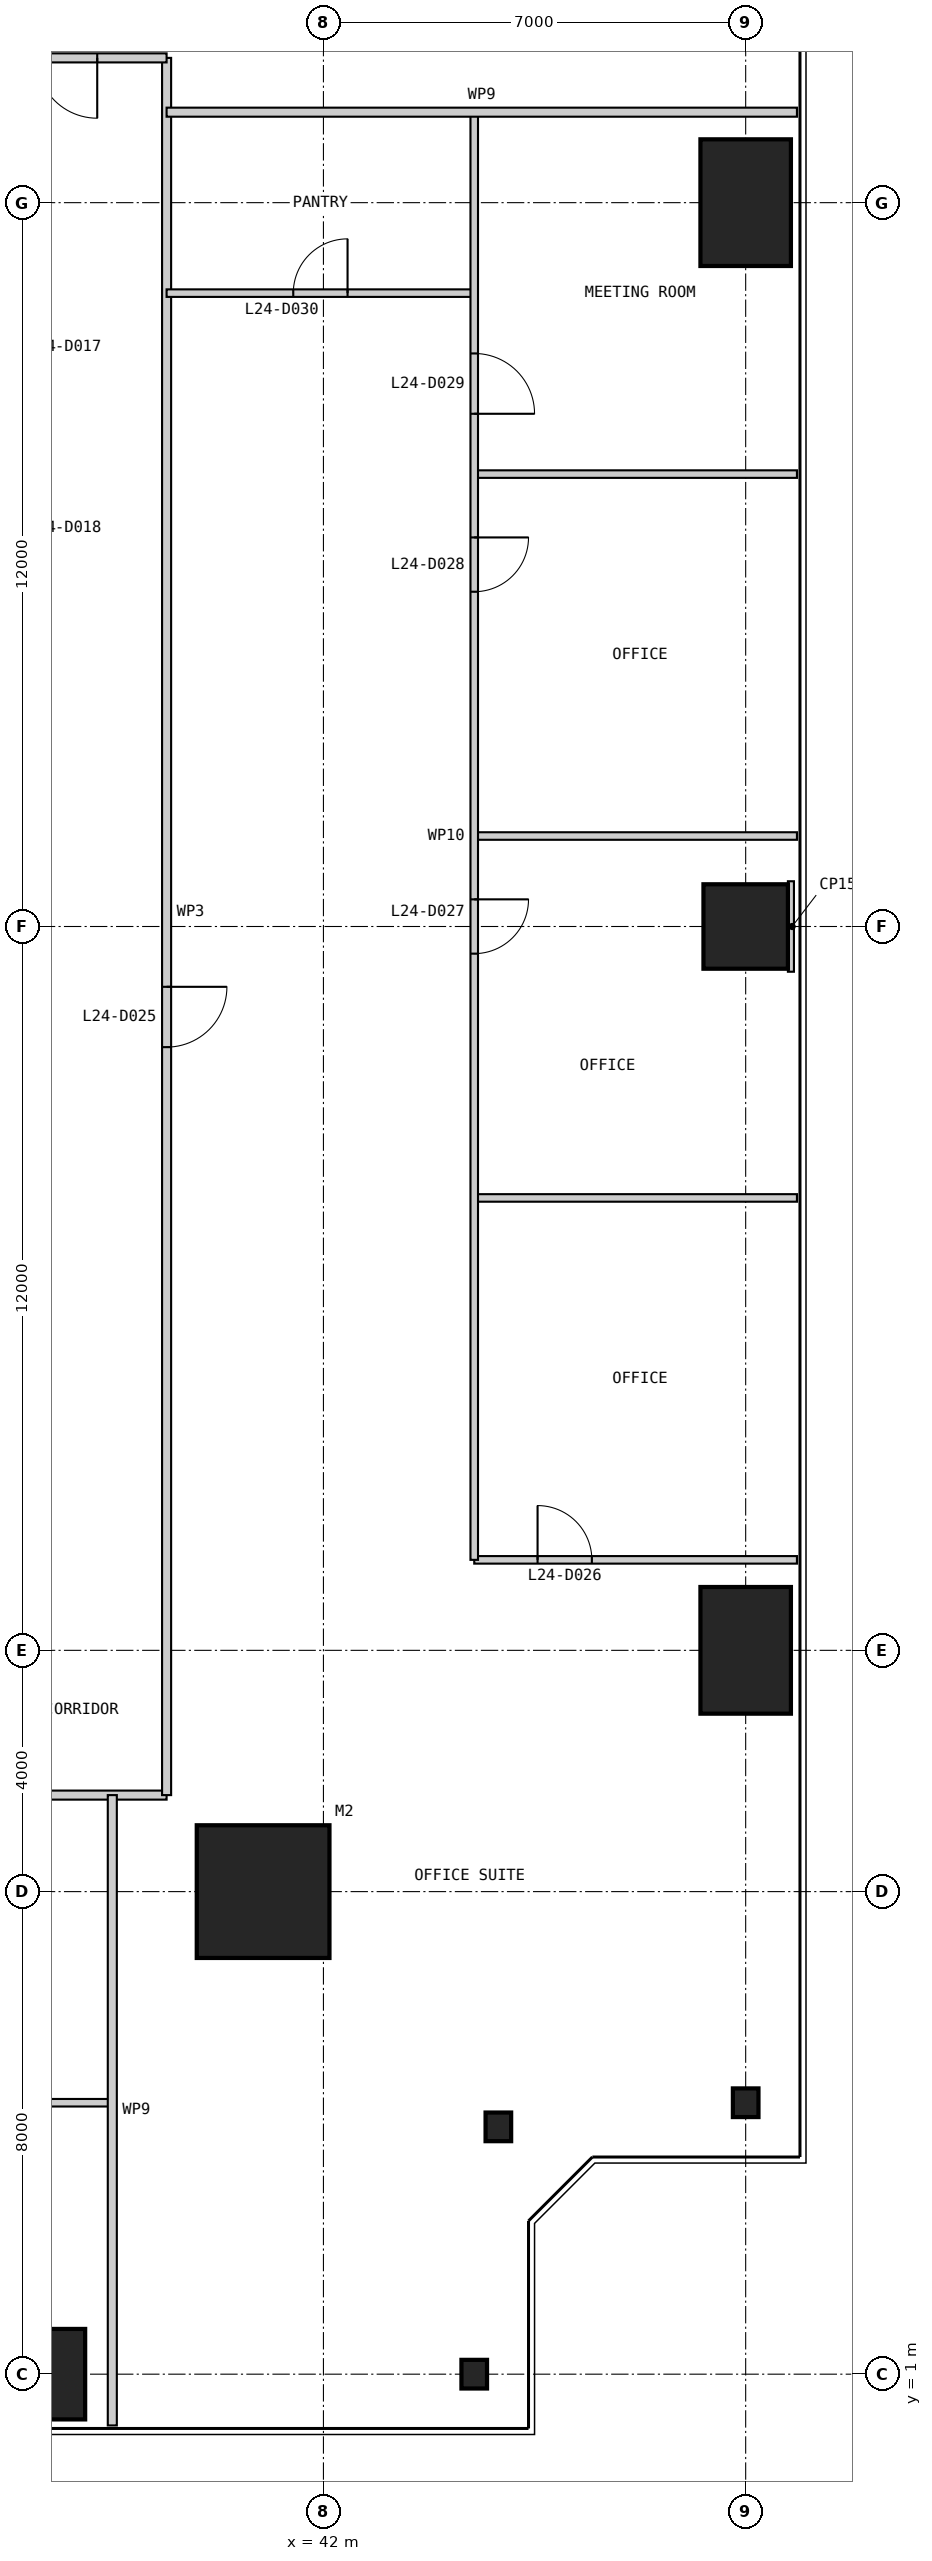
"""IFC4 building model, lengths in metres.
Left out: names, types, materials, properties, quantities, classifications, styles, units other than length and angle.
Written with IfcOpenShell. Run it as: python <this file> out.ifc"""

import sys

from ifc_helpers import new_model, si_unit, direction, frame, frame_2d, origin, origin_2d, place, context, subcontext, project, spatial, rectangle, i_section, extrude, element, fill, save


model = new_model("IFC4")
c1 = context("Model", 3, precision=1e-05, world=origin(), true_north=direction((0.0, 1.0)))
c2 = subcontext(c1, "Body", "Model", "MODEL_VIEW")
j1 = project(units=[si_unit("LENGTHUNIT", "METRE"), si_unit("PLANEANGLEUNIT", "RADIAN")], contexts=[c1])
p1 = place(None, origin())
s1 = spatial("IfcSite", under=j1, at=p1, CompositionType="ELEMENT")
p2 = place(p1, origin())
s2 = spatial("IfcBuilding", under=s1, at=p2, CompositionType="ELEMENT")
p3 = place(p2, frame((0.0, 0.0, 106.4)))
s3 = spatial("IfcBuildingStorey", under=s2, at=p3, CompositionType="ELEMENT", Elevation=106.4)
p4 = place(p3, frame((41.0, 9.0, 0.0), z_axis=(0.0, 0.0, 1.0), x_axis=(1.0, 0.0, 0.0)))
e1 = element("IfcColumn", 1, at=p4, inside=s3, PredefinedType="COLUMN", context=c2, shape_type="SweptSolid", body=[
    extrude(rectangle(XDim=2.2, YDim=2.2, at=origin_2d()), origin(), (0.0, 0.0, 1.0), 4.0),
])
p5 = place(p3, frame((37.0, 1.0, 0.0), z_axis=(0.0, 0.0, 1.0), x_axis=(1.0, 0.0, 0.0)))
e2 = element("IfcColumn", 2, at=p5, inside=s3, PredefinedType="COLUMN", context=c2, shape_type="SweptSolid", body=[
    extrude(rectangle(XDim=2.1, YDim=1.5, at=origin_2d()), origin(), (0.0, 0.0, 1.0), 4.0),
])
for number, where, z_axis, x_axis in (
    (3, (44.5, 1.0, 0.0), (0.0, 0.0, 1.0), (1.0, 0.0, 0.0)),
    (4, (44.9, 5.1, 0.0), (0.0, 0.0, 1.0), (1.0, 0.0, 0.0)),
    (5, (49.0, 5.5, 0.0), (0.0, 0.0, 1.0), (1.0, 0.0, 0.0)),
):
    element("IfcColumn", number, at=place(p3, frame(where, z_axis=z_axis, x_axis=x_axis)), inside=s3, PredefinedType="COLUMN", context=c2, shape_type="SweptSolid", body=[
        extrude(i_section(OverallWidth=0.424, OverallDepth=0.475, WebThickness=0.048, FlangeThickness=0.077, at=origin_2d()), origin(), (0.0, 0.0, 1.0), 4.0),
    ])
p6 = place(p3, frame((49.0, 13.0, 0.0), z_axis=(0.0, 0.0, 1.0), x_axis=(1.0, 0.0, 0.0)))
e6 = element("IfcColumn", 6, at=p6, inside=s3, PredefinedType="COLUMN", context=c2, shape_type="SweptSolid", body=[
    extrude(rectangle(XDim=1.5, YDim=2.1, at=origin_2d()), origin(), (0.0, 0.0, 1.0), 4.0),
])
p7 = place(p3, frame((49.0, 25.0, 0.0), z_axis=(0.0, 0.0, 1.0), x_axis=(1.0, 0.0, 0.0)))
e7 = element("IfcColumn", 7, at=p7, inside=s3, PredefinedType="COLUMN", context=c2, shape_type="SweptSolid", body=[
    extrude(rectangle(XDim=1.4, YDim=1.4, at=origin_2d()), origin(), (0.0, 0.0, 1.0), 4.0),
])
p8 = place(p3, frame((49.0, 37.0, 0.0), z_axis=(0.0, 0.0, 1.0), x_axis=(1.0, 0.0, 0.0)))
e8 = element("IfcColumn", 8, at=p8, inside=s3, PredefinedType="COLUMN", context=c2, shape_type="SweptSolid", body=[
    extrude(rectangle(XDim=1.5, YDim=2.1, at=origin_2d()), origin(), (0.0, 0.0, 1.0), 4.0),
])
p9 = place(p3, frame((11.5, 10.6, 0.0), z_axis=(0.0, 0.0, 1.0), x_axis=(1.0, 0.0, 0.0)))
e9 = element("IfcWall", 9, at=p9, inside=s3, PredefinedType="PARTITIONING", context=c2, shape_type="SweptSolid", body=[
    extrude(rectangle(XDim=27.9, YDim=0.15, at=frame_2d((13.95, 0.0))), origin(), (0.0, 0.0, 1.0), 3.85),
])
p10 = place(p9, frame((12.25, 0.0, 0.0)))
e10 = element("IfcOpeningElement", 10, at=p10, cuts=e9, PredefinedType="OPENING", context=c2, shape_type="SweptSolid", body=[
    extrude(rectangle(XDim=1.0, YDim=2.2, at=frame_2d((0.5, 1.1))), frame((0.0, 0.085, 0.0), z_axis=(0.0, -1.0, 0.0), x_axis=(1.0, 0.0, 0.0)), (0.0, 0.0, 1.0), 0.17),
])
p11 = place(p3, frame((14.5, 5.5, 0.0), z_axis=(0.0, 0.0, 1.0), x_axis=(1.0, 0.0, 0.0)))
e11 = element("IfcWall", 11, at=p11, inside=s3, PredefinedType="PARTITIONING", context=c2, shape_type="SweptSolid", body=[
    extrude(rectangle(XDim=24.0, YDim=0.125, at=frame_2d((12.0, 0.0))), origin(), (0.0, 0.0, 1.0), 3.85),
])
p12 = place(p11, frame((10.05, 0.0, 0.0)))
e12 = element("IfcOpeningElement", 12, at=p12, cuts=e11, PredefinedType="OPENING", context=c2, shape_type="SweptSolid", body=[
    extrude(rectangle(XDim=0.9, YDim=2.2, at=frame_2d((0.45, 1.1))), frame((0.0, 0.073, 0.0), z_axis=(0.0, -1.0, 0.0), x_axis=(1.0, 0.0, 0.0)), (0.0, 0.0, 1.0), 0.145),
])
p13 = place(p11, frame((16.05, 0.0, 0.0)))
e13 = element("IfcOpeningElement", 13, at=p13, cuts=e11, PredefinedType="OPENING", context=c2, shape_type="SweptSolid", body=[
    extrude(rectangle(XDim=0.9, YDim=2.2, at=frame_2d((0.45, 1.1))), frame((0.0, 0.073, 0.0), z_axis=(0.0, -1.0, 0.0), x_axis=(1.0, 0.0, 0.0)), (0.0, 0.0, 1.0), 0.145),
])
p14 = place(p11, frame((19.0, 0.0, 0.0)))
e14 = element("IfcOpeningElement", 14, at=p14, cuts=e11, PredefinedType="OPENING", context=c2, shape_type="SweptSolid", body=[
    extrude(rectangle(XDim=1.0, YDim=2.2, at=frame_2d((0.5, 1.1))), frame((0.0, 0.073, 0.0), z_axis=(0.0, -1.0, 0.0), x_axis=(1.0, 0.0, 0.0)), (0.0, 0.0, 1.0), 0.145),
])
p15 = place(p3, frame((39.4, 10.6, 0.0), z_axis=(0.0, 0.0, 1.0), x_axis=(0.0, 1.0, 0.0)))
e15 = element("IfcWall", 15, at=p15, inside=s3, PredefinedType="PARTITIONING", context=c2, shape_type="SweptSolid", body=[
    extrude(rectangle(XDim=28.8, YDim=0.15, at=frame_2d((14.4, 0.0))), origin(), (0.0, 0.0, 1.0), 3.85),
])
p16 = place(p15, frame((12.4, 0.0, 0.0)))
e16 = element("IfcOpeningElement", 16, at=p16, cuts=e15, PredefinedType="OPENING", context=c2, shape_type="SweptSolid", body=[
    extrude(rectangle(XDim=1.0, YDim=2.2, at=frame_2d((0.5, 1.1))), frame((0.0, 0.085, 0.0), z_axis=(0.0, -1.0, 0.0), x_axis=(1.0, 0.0, 0.0)), (0.0, 0.0, 1.0), 0.17),
])
p17 = place(p3, frame((38.5, 0.15, 0.0), z_axis=(0.0, 0.0, 1.0), x_axis=(0.0, 1.0, 0.0)))
e17 = element("IfcWall", 17, at=p17, inside=s3, PredefinedType="PARTITIONING", context=c2, shape_type="SweptSolid", body=[
    extrude(rectangle(XDim=10.45, YDim=0.15, at=frame_2d((5.225, 0.0))), origin(), (0.0, 0.0, 1.0), 3.85),
])
p18 = place(p3, frame((49.85, 14.5, 0.0), z_axis=(0.0, 0.0, 1.0), x_axis=(-1.0, 0.0, 0.0)))
e18 = element("IfcWall", 18, at=p18, inside=s3, PredefinedType="PARTITIONING", context=c2, shape_type="SweptSolid", body=[
    extrude(rectangle(XDim=5.35, YDim=0.125, at=frame_2d((2.675, 0.0))), origin(), (0.0, 0.0, 1.0), 3.85),
])
p19 = place(p18, frame((3.4, 0.0, 0.0)))
e19 = element("IfcOpeningElement", 19, at=p19, cuts=e18, PredefinedType="OPENING", context=c2, shape_type="SweptSolid", body=[
    extrude(rectangle(XDim=0.9, YDim=2.2, at=frame_2d((0.45, 1.1))), frame((0.0, 0.073, 0.0), z_axis=(0.0, -1.0, 0.0), x_axis=(1.0, 0.0, 0.0)), (0.0, 0.0, 1.0), 0.145),
])
for number, where, z_axis, x_axis in (
    (20, (49.85, 20.5, 0.0), (0.0, 0.0, 1.0), (-1.0, 0.0, 0.0)),
    (21, (49.85, 26.5, 0.0), (0.0, 0.0, 1.0), (-1.0, 0.0, 0.0)),
    (22, (49.85, 32.5, 0.0), (0.0, 0.0, 1.0), (-1.0, 0.0, 0.0)),
):
    element("IfcWall", number, at=place(p3, frame(where, z_axis=z_axis, x_axis=x_axis)), inside=s3, PredefinedType="PARTITIONING", context=c2, shape_type="SweptSolid", body=[
        extrude(rectangle(XDim=5.35, YDim=0.125, at=frame_2d((2.675, 0.0))), origin(), (0.0, 0.0, 1.0), 3.85),
    ])
p20 = place(p3, frame((44.5, 35.5, 0.0), z_axis=(0.0, 0.0, 1.0), x_axis=(-1.0, 0.0, 0.0)))
e23 = element("IfcWall", 23, at=p20, inside=s3, PredefinedType="PARTITIONING", context=c2, shape_type="SweptSolid", body=[
    extrude(rectangle(XDim=5.1, YDim=0.125, at=frame_2d((2.55, 0.0))), origin(), (0.0, 0.0, 1.0), 3.85),
])
p21 = place(p20, frame((2.1, 0.0, 0.0)))
e24 = element("IfcOpeningElement", 24, at=p21, cuts=e23, PredefinedType="OPENING", context=c2, shape_type="SweptSolid", body=[
    extrude(rectangle(XDim=0.9, YDim=2.2, at=frame_2d((0.45, 1.1))), frame((0.0, 0.073, 0.0), z_axis=(0.0, -1.0, 0.0), x_axis=(1.0, 0.0, 0.0)), (0.0, 0.0, 1.0), 0.145),
])
p22 = place(p3, frame((44.5, 14.5, 0.0), z_axis=(0.0, 0.0, 1.0), x_axis=(0.0, 1.0, 0.0)))
e25 = element("IfcWall", 25, at=p22, inside=s3, PredefinedType="PARTITIONING", context=c2, shape_type="SweptSolid", body=[
    extrude(rectangle(XDim=24.0, YDim=0.125, at=frame_2d((12.0, 0.0))), origin(), (0.0, 0.0, 1.0), 3.85),
])
p23 = place(p22, frame((10.05, 0.0, 0.0)))
e26 = element("IfcOpeningElement", 26, at=p23, cuts=e25, PredefinedType="OPENING", context=c2, shape_type="SweptSolid", body=[
    extrude(rectangle(XDim=0.9, YDim=2.2, at=frame_2d((0.45, 1.1))), frame((0.0, 0.073, 0.0), z_axis=(0.0, -1.0, 0.0), x_axis=(1.0, 0.0, 0.0)), (0.0, 0.0, 1.0), 0.145),
])
p24 = place(p22, frame((16.05, 0.0, 0.0)))
e27 = element("IfcOpeningElement", 27, at=p24, cuts=e25, PredefinedType="OPENING", context=c2, shape_type="SweptSolid", body=[
    extrude(rectangle(XDim=0.9, YDim=2.2, at=frame_2d((0.45, 1.1))), frame((0.0, 0.073, 0.0), z_axis=(0.0, -1.0, 0.0), x_axis=(1.0, 0.0, 0.0)), (0.0, 0.0, 1.0), 0.145),
])
p25 = place(p22, frame((19.0, 0.0, 0.0)))
e28 = element("IfcOpeningElement", 28, at=p25, cuts=e25, PredefinedType="OPENING", context=c2, shape_type="SweptSolid", body=[
    extrude(rectangle(XDim=1.0, YDim=2.2, at=frame_2d((0.5, 1.1))), frame((0.0, 0.073, 0.0), z_axis=(0.0, -1.0, 0.0), x_axis=(1.0, 0.0, 0.0)), (0.0, 0.0, 1.0), 0.145),
])
p26 = place(p3, frame((39.4, 39.4, 0.0), z_axis=(0.0, 0.0, 1.0), x_axis=(-1.0, 0.0, 0.0)))
e29 = element("IfcWall", 29, at=p26, inside=s3, PredefinedType="PARTITIONING", context=c2, shape_type="SweptSolid", body=[
    extrude(rectangle(XDim=27.9, YDim=0.15, at=frame_2d((13.95, 0.0))), origin(), (0.0, 0.0, 1.0), 3.85),
])
p27 = place(p26, frame((4.15, 0.0, 0.0)))
e30 = element("IfcOpeningElement", 30, at=p27, cuts=e29, PredefinedType="OPENING", context=c2, shape_type="SweptSolid", body=[
    extrude(rectangle(XDim=1.0, YDim=2.2, at=frame_2d((0.5, 1.1))), frame((0.0, 0.085, 0.0), z_axis=(0.0, -1.0, 0.0), x_axis=(1.0, 0.0, 0.0)), (0.0, 0.0, 1.0), 0.17),
])
p28 = place(p26, frame((25.15, 0.0, 0.0)))
e31 = element("IfcOpeningElement", 31, at=p28, cuts=e29, PredefinedType="OPENING", context=c2, shape_type="SweptSolid", body=[
    extrude(rectangle(XDim=1.0, YDim=2.2, at=frame_2d((0.5, 1.1))), frame((0.0, 0.085, 0.0), z_axis=(0.0, -1.0, 0.0), x_axis=(1.0, 0.0, 0.0)), (0.0, 0.0, 1.0), 0.17),
])
p29 = place(p26, frame((1.15, 0.0, 0.0)))
e32 = element("IfcOpeningElement", 32, at=p29, cuts=e29, PredefinedType="OPENING", context=c2, shape_type="SweptSolid", body=[
    extrude(rectangle(XDim=1.0, YDim=2.2, at=frame_2d((0.5, 1.1))), frame((0.0, 0.085, 0.0), z_axis=(0.0, -1.0, 0.0), x_axis=(1.0, 0.0, 0.0)), (0.0, 0.0, 1.0), 0.17),
])
p30 = place(p3, frame((49.85, 38.5, 0.0), z_axis=(0.0, 0.0, 1.0), x_axis=(-1.0, 0.0, 0.0)))
e33 = element("IfcWall", 33, at=p30, inside=s3, PredefinedType="PARTITIONING", context=c2, shape_type="SweptSolid", body=[
    extrude(rectangle(XDim=10.45, YDim=0.15, at=frame_2d((5.225, 0.0))), origin(), (0.0, 0.0, 1.0), 3.85),
])
p31 = place(p3, frame((49.8, 25.0, 0.0), z_axis=(0.0, 0.0, 1.0), x_axis=(-1.0, 0.0, 0.0)))
e34 = element("IfcWall", 34, at=p31, inside=s3, PredefinedType="PARTITIONING", context=c2, shape_type="SweptSolid", body=[
    extrude(rectangle(XDim=0.1, YDim=1.5, at=frame_2d((0.05, 0.0))), origin(), (0.0, 0.0, 1.0), 3.85),
])
p32 = place(p16, frame((1.0, 0.0, 0.0), z_axis=(0.0, 0.0, 1.0), x_axis=(-1.0, 0.0, 0.0)))
e35 = element("IfcDoor", 35, at=p32, inside=s3, OperationType="SINGLE_SWING_LEFT", PredefinedType="DOOR", context=c2, shape_type="SweptSolid", body=[
    extrude(rectangle(XDim=1.0, YDim=2.2, at=frame_2d((0.5, 1.1))), frame((0.0, 0.025, 0.0), z_axis=(0.0, -1.0, 0.0), x_axis=(1.0, 0.0, 0.0)), (0.0, 0.0, 1.0), 0.05),
])
fill(e16, e35)
p33 = place(p19, frame((0.9, 0.0, 0.0), z_axis=(0.0, 0.0, 1.0), x_axis=(-1.0, 0.0, 0.0)))
e36 = element("IfcDoor", 36, at=p33, inside=s3, OperationType="SINGLE_SWING_LEFT", PredefinedType="DOOR", context=c2, shape_type="SweptSolid", body=[
    extrude(rectangle(XDim=0.9, YDim=2.2, at=frame_2d((0.45, 1.1))), frame((0.0, 0.025, 0.0), z_axis=(0.0, -1.0, 0.0), x_axis=(1.0, 0.0, 0.0)), (0.0, 0.0, 1.0), 0.05),
])
fill(e19, e36)
p34 = place(p23, frame((0.9, 0.0, 0.0), z_axis=(0.0, 0.0, 1.0), x_axis=(-1.0, 0.0, 0.0)))
e37 = element("IfcDoor", 37, at=p34, inside=s3, OperationType="SINGLE_SWING_LEFT", PredefinedType="DOOR", context=c2, shape_type="SweptSolid", body=[
    extrude(rectangle(XDim=0.9, YDim=2.2, at=frame_2d((0.45, 1.1))), frame((0.0, 0.025, 0.0), z_axis=(0.0, -1.0, 0.0), x_axis=(1.0, 0.0, 0.0)), (0.0, 0.0, 1.0), 0.05),
])
fill(e26, e37)
p35 = place(p24, frame((0.9, 0.0, 0.0), z_axis=(0.0, 0.0, 1.0), x_axis=(-1.0, 0.0, 0.0)))
e38 = element("IfcDoor", 38, at=p35, inside=s3, OperationType="SINGLE_SWING_LEFT", PredefinedType="DOOR", context=c2, shape_type="SweptSolid", body=[
    extrude(rectangle(XDim=0.9, YDim=2.2, at=frame_2d((0.45, 1.1))), frame((0.0, 0.025, 0.0), z_axis=(0.0, -1.0, 0.0), x_axis=(1.0, 0.0, 0.0)), (0.0, 0.0, 1.0), 0.05),
])
fill(e27, e38)
p36 = place(p25, frame((1.0, 0.0, 0.0), z_axis=(0.0, 0.0, 1.0), x_axis=(-1.0, 0.0, 0.0)))
e39 = element("IfcDoor", 39, at=p36, inside=s3, OperationType="SINGLE_SWING_RIGHT", PredefinedType="DOOR", context=c2, shape_type="SweptSolid", body=[
    extrude(rectangle(XDim=1.0, YDim=2.2, at=frame_2d((0.5, 1.1))), frame((0.0, 0.025, 0.0), z_axis=(0.0, -1.0, 0.0), x_axis=(1.0, 0.0, 0.0)), (0.0, 0.0, 1.0), 0.05),
])
fill(e28, e39)
p37 = place(p21, frame((0.9, 0.0, 0.0), z_axis=(0.0, 0.0, 1.0), x_axis=(-1.0, 0.0, 0.0)))
e40 = element("IfcDoor", 40, at=p37, inside=s3, OperationType="SINGLE_SWING_RIGHT", PredefinedType="DOOR", context=c2, shape_type="SweptSolid", body=[
    extrude(rectangle(XDim=0.9, YDim=2.2, at=frame_2d((0.45, 1.1))), frame((0.0, 0.025, 0.0), z_axis=(0.0, -1.0, 0.0), x_axis=(1.0, 0.0, 0.0)), (0.0, 0.0, 1.0), 0.05),
])
fill(e24, e40)
p38 = place(p29, origin())
e41 = element("IfcDoor", 41, at=p38, inside=s3, OperationType="SINGLE_SWING_LEFT", PredefinedType="DOOR", context=c2, shape_type="SweptSolid", body=[
    extrude(rectangle(XDim=1.0, YDim=2.2, at=frame_2d((0.5, 1.1))), frame((0.0, 0.025, 0.0), z_axis=(0.0, -1.0, 0.0), x_axis=(1.0, 0.0, 0.0)), (0.0, 0.0, 1.0), 0.05),
])
fill(e32, e41)
save(model, sys.argv[1])
